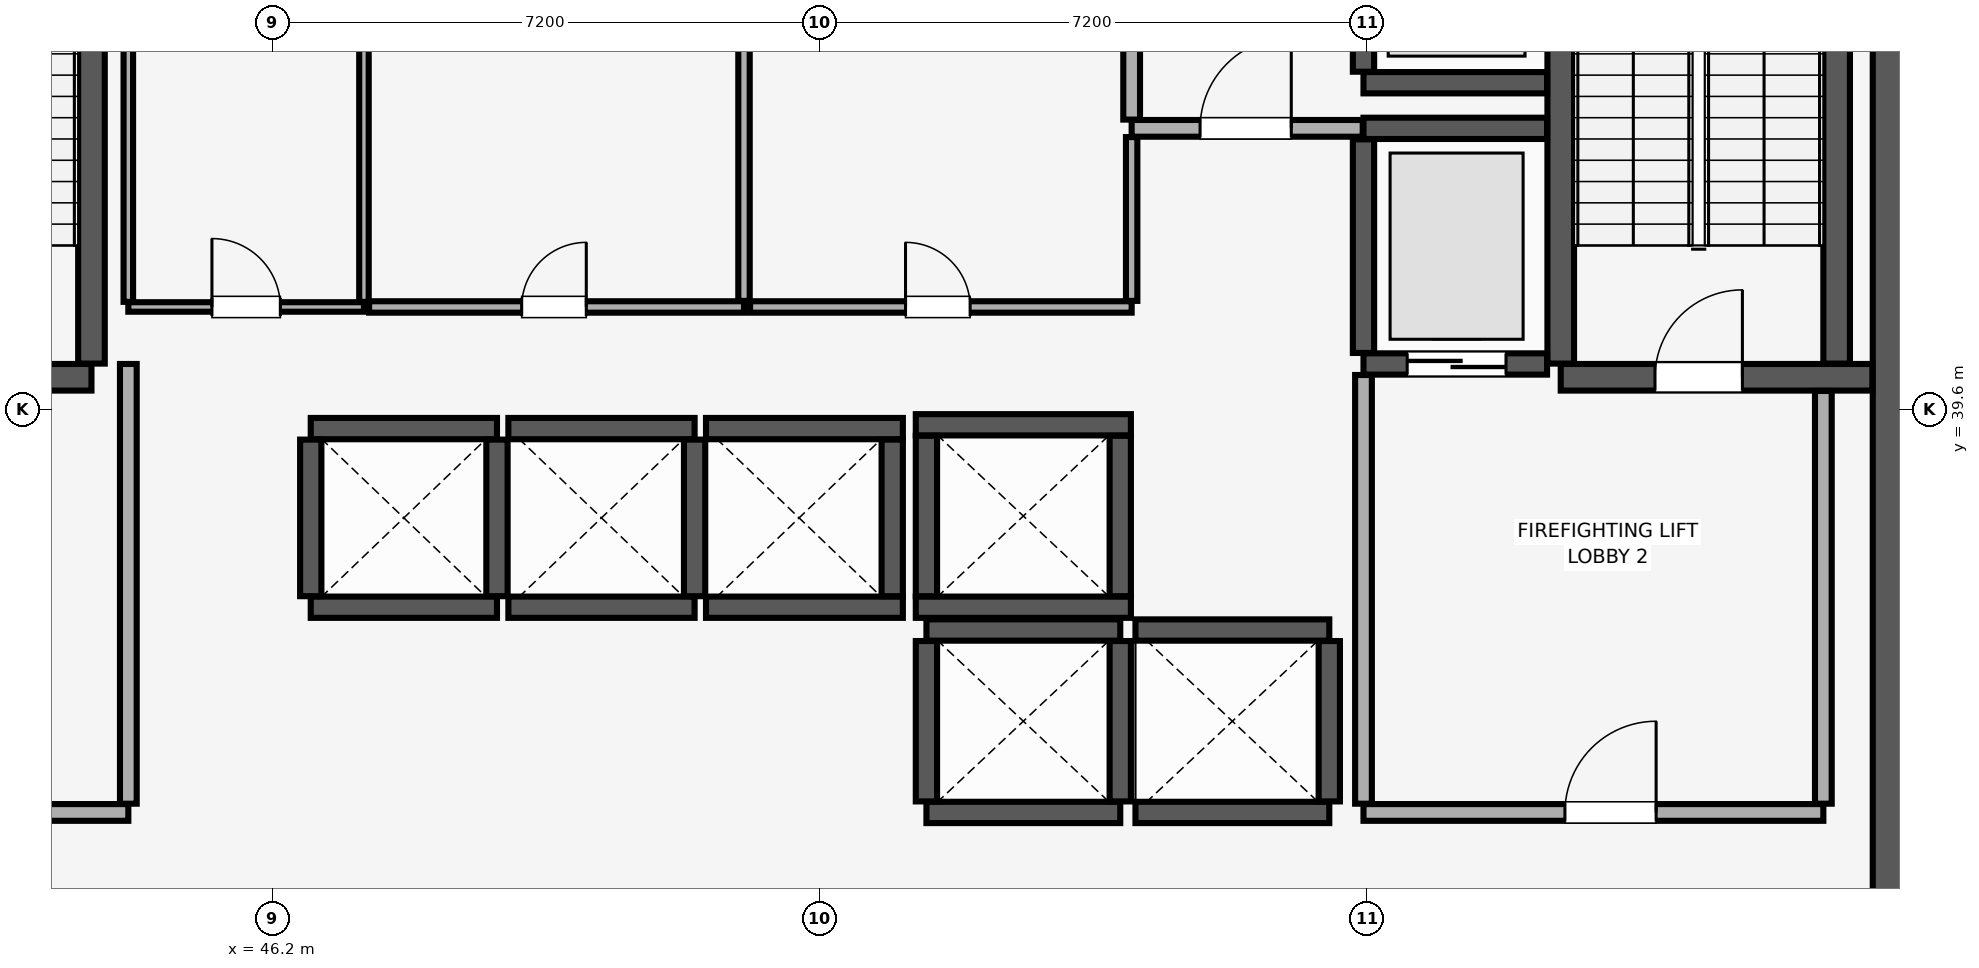
"""IFC4 building model, lengths in metres.
Left out: names, types, materials, properties, quantities, classifications, styles, units other than length and angle.
Written with IfcOpenShell. Run it as: python <this file> out.ifc"""

import sys

from ifc_helpers import new_model, si_unit, direction, frame, frame_2d, origin, place, context, subcontext, project, spatial, rectangle, extrude, element, fill, save


model = new_model("IFC4")
c1 = context("Model", 3, precision=1e-05, world=origin(), true_north=direction((0.0, 1.0)))
c2 = subcontext(c1, "Body", "Model", "MODEL_VIEW")
j1 = project(units=[si_unit("LENGTHUNIT", "METRE"), si_unit("PLANEANGLEUNIT", "RADIAN")], contexts=[c1])
p1 = place(None, origin())
s1 = spatial("IfcSite", under=j1, at=p1, CompositionType="ELEMENT")
p2 = place(p1, origin())
s2 = spatial("IfcBuilding", under=s1, at=p2, CompositionType="ELEMENT")
p3 = place(p2, frame((0.0, 0.0, 68.9)))
s3 = spatial("IfcBuildingStorey", under=s2, at=p3, CompositionType="ELEMENT", Elevation=68.9)
p4 = place(p3, frame((67.8, 29.4, 0.0), z_axis=(0.0, 0.0, 1.0), x_axis=(0.0, 1.0, 0.0)))
e1 = element("IfcWall", 1, at=p4, inside=s3, PredefinedType="SHEAR", context=c2, shape_type="SweptSolid", body=[
    extrude(rectangle(XDim=19.2, YDim=1.1, at=frame_2d((9.6, 0.0))), origin(), (0.0, 0.0, 1.0), 3.51),
])
p5 = place(p3, frame((40.185, 40.025, 0.0), z_axis=(0.0, 0.0, 1.0), x_axis=(1.0, 0.0, 0.0)))
e2 = element("IfcWall", 2, at=p5, inside=s3, PredefinedType="SHEAR", context=c2, shape_type="SweptSolid", body=[
    extrude(rectangle(XDim=3.63, YDim=0.35, at=frame_2d((1.815, 0.0))), origin(), (0.0, 0.0, 1.0), 3.51),
])
p6 = place(p5, frame((1.24, 0.0, 0.0)))
e3 = element("IfcOpeningElement", 3, at=p6, cuts=e2, PredefinedType="OPENING", context=c2, shape_type="SweptSolid", body=[
    extrude(rectangle(XDim=1.15, YDim=2.15, at=frame_2d((0.575, 1.075))), frame((0.0, 0.185, 0.0), z_axis=(0.0, -1.0, 0.0), x_axis=(1.0, 0.0, 0.0)), (0.0, 0.0, 1.0), 0.37),
])
p7 = place(p3, frame((43.815, 40.205, 0.0), z_axis=(0.0, 0.0, 1.0), x_axis=(0.0, 1.0, 0.0)))
e4 = element("IfcWall", 4, at=p7, inside=s3, PredefinedType="SHEAR", context=c2, shape_type="SweptSolid", body=[
    extrude(rectangle(XDim=8.09, YDim=0.35, at=frame_2d((4.045, 0.0))), origin(), (0.0, 0.0, 1.0), 3.51),
])
p8 = place(p3, frame((63.145, 40.025, 0.0), z_axis=(0.0, 0.0, 1.0), x_axis=(1.0, 0.0, 0.0)))
e5 = element("IfcWall", 5, at=p8, inside=s3, PredefinedType="SHEAR", context=c2, shape_type="SweptSolid", body=[
    extrude(rectangle(XDim=4.1, YDim=0.35, at=frame_2d((2.05, 0.0))), origin(), (0.0, 0.0, 1.0), 3.51),
])
p9 = place(p8, frame((1.24, 0.0, 0.0)))
e6 = element("IfcOpeningElement", 6, at=p9, cuts=e5, PredefinedType="OPENING", context=c2, shape_type="SweptSolid", body=[
    extrude(rectangle(XDim=1.15, YDim=2.15, at=frame_2d((0.575, 1.075))), frame((0.0, 0.185, 0.0), z_axis=(0.0, -1.0, 0.0), x_axis=(1.0, 0.0, 0.0)), (0.0, 0.0, 1.0), 0.37),
])
for number, where, z_axis, x_axis in (
    (7, (63.145, 40.205, 0.0), (0.0, 0.0, 1.0), (0.0, 1.0, 0.0)),
    (8, (66.775, 40.205, 0.0), (0.0, 0.0, 1.0), (0.0, 1.0, 0.0)),
):
    element("IfcWall", number, at=place(p3, frame(where, z_axis=z_axis, x_axis=x_axis)), inside=s3, PredefinedType="SHEAR", context=c2, shape_type="SweptSolid", body=[
        extrude(rectangle(XDim=8.09, YDim=0.35, at=frame_2d((4.045, 0.0))), origin(), (0.0, 0.0, 1.0), 3.51),
    ])
for number, where, z_axis, x_axis in (
    (9, (46.7, 37.0, 0.0), (0.0, 0.0, 1.0), (1.0, 0.0, 0.0)),
    (10, (46.7, 39.35, 0.0), (0.0, 0.0, 1.0), (1.0, 0.0, 0.0)),
):
    element("IfcWall", number, at=place(p3, frame(where, z_axis=z_axis, x_axis=x_axis)), inside=s3, PredefinedType="SHEAR", context=c2, shape_type="SweptSolid", body=[
        extrude(rectangle(XDim=2.45, YDim=0.28, at=frame_2d((1.225, 0.0))), origin(), (0.0, 0.0, 1.0), 3.51),
    ])
for number, where, z_axis, x_axis in (
    (11, (46.7, 37.145, 0.0), (0.0, 0.0, 1.0), (0.0, 1.0, 0.0)),
    (12, (49.15, 37.145, 0.0), (0.0, 0.0, 1.0), (0.0, 1.0, 0.0)),
):
    element("IfcWall", number, at=place(p3, frame(where, z_axis=z_axis, x_axis=x_axis)), inside=s3, PredefinedType="SHEAR", context=c2, shape_type="SweptSolid", body=[
        extrude(rectangle(XDim=2.06, YDim=0.28, at=frame_2d((1.03, 0.0))), origin(), (0.0, 0.0, 1.0), 3.51),
    ])
for number, where, z_axis, x_axis in (
    (13, (49.3, 37.0, 0.0), (0.0, 0.0, 1.0), (1.0, 0.0, 0.0)),
    (14, (49.3, 39.35, 0.0), (0.0, 0.0, 1.0), (1.0, 0.0, 0.0)),
):
    element("IfcWall", number, at=place(p3, frame(where, z_axis=z_axis, x_axis=x_axis)), inside=s3, PredefinedType="SHEAR", context=c2, shape_type="SweptSolid", body=[
        extrude(rectangle(XDim=2.45, YDim=0.28, at=frame_2d((1.225, 0.0))), origin(), (0.0, 0.0, 1.0), 3.51),
    ])
p10 = place(p3, frame((51.75, 37.145, 0.0), z_axis=(0.0, 0.0, 1.0), x_axis=(0.0, 1.0, 0.0)))
e15 = element("IfcWall", 15, at=p10, inside=s3, PredefinedType="SHEAR", context=c2, shape_type="SweptSolid", body=[
    extrude(rectangle(XDim=2.06, YDim=0.28, at=frame_2d((1.03, 0.0))), origin(), (0.0, 0.0, 1.0), 3.51),
])
for number, where, z_axis, x_axis in (
    (16, (51.9, 37.0, 0.0), (0.0, 0.0, 1.0), (1.0, 0.0, 0.0)),
    (17, (51.9, 39.35, 0.0), (0.0, 0.0, 1.0), (1.0, 0.0, 0.0)),
):
    element("IfcWall", number, at=place(p3, frame(where, z_axis=z_axis, x_axis=x_axis)), inside=s3, PredefinedType="SHEAR", context=c2, shape_type="SweptSolid", body=[
        extrude(rectangle(XDim=2.59, YDim=0.28, at=frame_2d((1.295, 0.0))), origin(), (0.0, 0.0, 1.0), 3.51),
    ])
p11 = place(p3, frame((54.35, 37.145, 0.0), z_axis=(0.0, 0.0, 1.0), x_axis=(0.0, 1.0, 0.0)))
e18 = element("IfcWall", 18, at=p11, inside=s3, PredefinedType="SHEAR", context=c2, shape_type="SweptSolid", body=[
    extrude(rectangle(XDim=2.06, YDim=0.28, at=frame_2d((1.03, 0.0))), origin(), (0.0, 0.0, 1.0), 3.51),
])
for number, where, z_axis, x_axis in (
    (19, (54.8, 34.3, 0.0), (0.0, 0.0, 1.0), (1.0, 0.0, 0.0)),
    (20, (54.8, 36.7, 0.0), (0.0, 0.0, 1.0), (1.0, 0.0, 0.0)),
):
    element("IfcWall", number, at=place(p3, frame(where, z_axis=z_axis, x_axis=x_axis)), inside=s3, PredefinedType="SHEAR", context=c2, shape_type="SweptSolid", body=[
        extrude(rectangle(XDim=2.55, YDim=0.28, at=frame_2d((1.275, 0.0))), origin(), (0.0, 0.0, 1.0), 3.51),
    ])
for number, where, z_axis, x_axis in (
    (21, (54.8, 34.445, 0.0), (0.0, 0.0, 1.0), (0.0, 1.0, 0.0)),
    (22, (57.35, 34.445, 0.0), (0.0, 0.0, 1.0), (0.0, 1.0, 0.0)),
):
    element("IfcWall", number, at=place(p3, frame(where, z_axis=z_axis, x_axis=x_axis)), inside=s3, PredefinedType="SHEAR", context=c2, shape_type="SweptSolid", body=[
        extrude(rectangle(XDim=2.11, YDim=0.28, at=frame_2d((1.055, 0.0))), origin(), (0.0, 0.0, 1.0), 3.51),
    ])
for number, where, z_axis, x_axis in (
    (23, (57.55, 34.3, 0.0), (0.0, 0.0, 1.0), (1.0, 0.0, 0.0)),
    (24, (57.55, 36.7, 0.0), (0.0, 0.0, 1.0), (1.0, 0.0, 0.0)),
):
    element("IfcWall", number, at=place(p3, frame(where, z_axis=z_axis, x_axis=x_axis)), inside=s3, PredefinedType="SHEAR", context=c2, shape_type="SweptSolid", body=[
        extrude(rectangle(XDim=2.55, YDim=0.28, at=frame_2d((1.275, 0.0))), origin(), (0.0, 0.0, 1.0), 3.51),
    ])
p12 = place(p3, frame((60.1, 34.445, 0.0), z_axis=(0.0, 0.0, 1.0), x_axis=(0.0, 1.0, 0.0)))
e25 = element("IfcWall", 25, at=p12, inside=s3, PredefinedType="SHEAR", context=c2, shape_type="SweptSolid", body=[
    extrude(rectangle(XDim=2.11, YDim=0.28, at=frame_2d((1.055, 0.0))), origin(), (0.0, 0.0, 1.0), 3.51),
])
for number, where, z_axis, x_axis in (
    (26, (54.66, 37.0, 0.0), (0.0, 0.0, 1.0), (1.0, 0.0, 0.0)),
    (27, (54.66, 39.4, 0.0), (0.0, 0.0, 1.0), (1.0, 0.0, 0.0)),
):
    element("IfcWall", number, at=place(p3, frame(where, z_axis=z_axis, x_axis=x_axis)), inside=s3, PredefinedType="SHEAR", context=c2, shape_type="SweptSolid", body=[
        extrude(rectangle(XDim=2.83, YDim=0.28, at=frame_2d((1.415, 0.0))), origin(), (0.0, 0.0, 1.0), 3.51),
    ])
for number, where, z_axis, x_axis in (
    (28, (54.8, 37.145, 0.0), (0.0, 0.0, 1.0), (0.0, 1.0, 0.0)),
    (29, (57.35, 37.145, 0.0), (0.0, 0.0, 1.0), (0.0, 1.0, 0.0)),
):
    element("IfcWall", number, at=place(p3, frame(where, z_axis=z_axis, x_axis=x_axis)), inside=s3, PredefinedType="SHEAR", context=c2, shape_type="SweptSolid", body=[
        extrude(rectangle(XDim=2.11, YDim=0.28, at=frame_2d((1.055, 0.0))), origin(), (0.0, 0.0, 1.0), 3.51),
    ])
p13 = place(p3, frame((60.55, 40.2, 0.0), z_axis=(0.0, 0.0, 1.0), x_axis=(1.0, 0.0, 0.0)))
e30 = element("IfcWall", 30, at=p13, inside=s3, PredefinedType="SHEAR", context=c2, shape_type="SweptSolid", body=[
    extrude(rectangle(XDim=2.415, YDim=0.28, at=frame_2d((1.208, 0.0))), origin(), (0.0, 0.0, 1.0), 3.51),
])
p14 = place(p13, frame((0.575, 0.0, 0.0)))
e31 = element("IfcOpeningElement", 31, at=p14, cuts=e30, PredefinedType="OPENING", context=c2, shape_type="SweptSolid", body=[
    extrude(rectangle(XDim=1.3, YDim=2.3, at=frame_2d((0.65, 1.15))), frame((0.0, 0.15, 0.0), z_axis=(0.0, -1.0, 0.0), x_axis=(1.0, 0.0, 0.0)), (0.0, 0.0, 1.0), 0.3),
])
p15 = place(p3, frame((60.55, 43.3, 0.0), z_axis=(0.0, 0.0, 1.0), x_axis=(1.0, 0.0, 0.0)))
e32 = element("IfcWall", 32, at=p15, inside=s3, PredefinedType="SHEAR", context=c2, shape_type="SweptSolid", body=[
    extrude(rectangle(XDim=2.415, YDim=0.28, at=frame_2d((1.208, 0.0))), origin(), (0.0, 0.0, 1.0), 3.51),
])
p16 = place(p3, frame((60.55, 40.345, 0.0), z_axis=(0.0, 0.0, 1.0), x_axis=(0.0, 1.0, 0.0)))
e33 = element("IfcWall", 33, at=p16, inside=s3, PredefinedType="SHEAR", context=c2, shape_type="SweptSolid", body=[
    extrude(rectangle(XDim=2.81, YDim=0.28, at=frame_2d((1.405, 0.0))), origin(), (0.0, 0.0, 1.0), 3.51),
])
p17 = place(p3, frame((60.55, 43.9, 0.0), z_axis=(0.0, 0.0, 1.0), x_axis=(1.0, 0.0, 0.0)))
e34 = element("IfcWall", 34, at=p17, inside=s3, PredefinedType="SHEAR", context=c2, shape_type="SweptSolid", body=[
    extrude(rectangle(XDim=2.415, YDim=0.28, at=frame_2d((1.208, 0.0))), origin(), (0.0, 0.0, 1.0), 3.51),
])
p18 = place(p3, frame((60.55, 44.045, 0.0), z_axis=(0.0, 0.0, 1.0), x_axis=(0.0, 1.0, 0.0)))
e35 = element("IfcWall", 35, at=p18, inside=s3, PredefinedType="SHEAR", context=c2, shape_type="SweptSolid", body=[
    extrude(rectangle(XDim=3.11, YDim=0.28, at=frame_2d((1.555, 0.0))), origin(), (0.0, 0.0, 1.0), 3.51),
])
p19 = place(p18, frame((0.905, 0.0, 0.0)))
e36 = element("IfcOpeningElement", 36, at=p19, cuts=e35, PredefinedType="OPENING", context=c2, shape_type="SweptSolid", body=[
    extrude(rectangle(XDim=1.3, YDim=2.3, at=frame_2d((0.65, 1.15))), frame((0.0, 0.15, 0.0), z_axis=(0.0, -1.0, 0.0), x_axis=(1.0, 0.0, 0.0)), (0.0, 0.0, 1.0), 0.3),
])
p20 = place(p3, frame((60.55, 34.3, 0.0), z_axis=(0.0, 0.0, 1.0), x_axis=(1.0, 0.0, 0.0)))
e37 = element("IfcWall", 37, at=p20, inside=s3, PredefinedType="PARTITIONING", context=c2, shape_type="SweptSolid", body=[
    extrude(rectangle(XDim=6.05, YDim=0.22, at=frame_2d((3.025, 0.0))), origin(), (0.0, 0.0, 1.0), 3.51),
])
p21 = place(p20, frame((2.65, 0.0, 0.0)))
e38 = element("IfcOpeningElement", 38, at=p21, cuts=e37, PredefinedType="OPENING", context=c2, shape_type="SweptSolid", body=[
    extrude(rectangle(XDim=1.2, YDim=2.15, at=frame_2d((0.6, 1.075))), frame((0.0, 0.12, 0.0), z_axis=(0.0, -1.0, 0.0), x_axis=(1.0, 0.0, 0.0)), (0.0, 0.0, 1.0), 0.24),
])
p22 = place(p3, frame((60.55, 34.415, 0.0), z_axis=(0.0, 0.0, 1.0), x_axis=(0.0, 1.0, 0.0)))
e39 = element("IfcWall", 39, at=p22, inside=s3, PredefinedType="PARTITIONING", context=c2, shape_type="SweptSolid", body=[
    extrude(rectangle(XDim=5.64, YDim=0.22, at=frame_2d((2.82, 0.0))), origin(), (0.0, 0.0, 1.0), 3.51),
])
p23 = place(p3, frame((66.6, 34.415, 0.0), z_axis=(0.0, 0.0, 1.0), x_axis=(0.0, 1.0, 0.0)))
e40 = element("IfcWall", 40, at=p23, inside=s3, PredefinedType="PARTITIONING", context=c2, shape_type="SweptSolid", body=[
    extrude(rectangle(XDim=5.43, YDim=0.22, at=frame_2d((2.715, 0.0))), origin(), (0.0, 0.0, 1.0), 3.51),
])
p24 = place(p3, frame((39.7, 34.3, 0.0), z_axis=(0.0, 0.0, 1.0), x_axis=(1.0, 0.0, 0.0)))
e41 = element("IfcWall", 41, at=p24, inside=s3, PredefinedType="PARTITIONING", context=c2, shape_type="SweptSolid", body=[
    extrude(rectangle(XDim=4.6, YDim=0.22, at=frame_2d((2.3, 0.0))), origin(), (0.0, 0.0, 1.0), 3.51),
])
p25 = place(p24, frame((1.7, 0.0, 0.0)))
e42 = element("IfcOpeningElement", 42, at=p25, cuts=e41, PredefinedType="OPENING", context=c2, shape_type="SweptSolid", body=[
    extrude(rectangle(XDim=1.2, YDim=2.15, at=frame_2d((0.6, 1.075))), frame((0.0, 0.12, 0.0), z_axis=(0.0, -1.0, 0.0), x_axis=(1.0, 0.0, 0.0)), (0.0, 0.0, 1.0), 0.24),
])
p26 = place(p3, frame((44.3, 34.415, 0.0), z_axis=(0.0, 0.0, 1.0), x_axis=(0.0, 1.0, 0.0)))
e43 = element("IfcWall", 43, at=p26, inside=s3, PredefinedType="PARTITIONING", context=c2, shape_type="SweptSolid", body=[
    extrude(rectangle(XDim=5.785, YDim=0.22, at=frame_2d((2.893, 0.0))), origin(), (0.0, 0.0, 1.0), 3.51),
])
p27 = place(p3, frame((57.5, 43.3, 0.0), z_axis=(0.0, 0.0, 1.0), x_axis=(1.0, 0.0, 0.0)))
e44 = element("IfcWall", 44, at=p27, inside=s3, PredefinedType="PARTITIONING", context=c2, shape_type="SweptSolid", body=[
    extrude(rectangle(XDim=3.04, YDim=0.22, at=frame_2d((1.52, 0.0))), origin(), (0.0, 0.0, 1.0), 3.51),
])
p28 = place(p27, frame((0.9, 0.0, 0.0)))
e45 = element("IfcOpeningElement", 45, at=p28, cuts=e44, PredefinedType="OPENING", context=c2, shape_type="SweptSolid", body=[
    extrude(rectangle(XDim=1.2, YDim=2.15, at=frame_2d((0.6, 1.075))), frame((0.0, 0.12, 0.0), z_axis=(0.0, -1.0, 0.0), x_axis=(1.0, 0.0, 0.0)), (0.0, 0.0, 1.0), 0.24),
])
p29 = place(p3, frame((57.5, 43.415, 0.0), z_axis=(0.0, 0.0, 1.0), x_axis=(0.0, 1.0, 0.0)))
e46 = element("IfcWall", 46, at=p29, inside=s3, PredefinedType="PARTITIONING", context=c2, shape_type="SweptSolid", body=[
    extrude(rectangle(XDim=5.435, YDim=0.22, at=frame_2d((2.718, 0.0))), origin(), (0.0, 0.0, 1.0), 3.51),
])
p30 = place(p3, frame((44.3, 40.95, 0.0), z_axis=(0.0, 0.0, 1.0), x_axis=(1.0, 0.0, 0.0)))
e47 = element("IfcWall", 47, at=p30, inside=s3, PredefinedType="PARTITIONING", context=c2, shape_type="SweptSolid", body=[
    extrude(rectangle(XDim=3.1, YDim=0.125, at=frame_2d((1.55, 0.0))), origin(), (0.0, 0.0, 1.0), 3.51),
])
p31 = place(p30, frame((1.1, 0.0, 0.0)))
e48 = element("IfcOpeningElement", 48, at=p31, cuts=e47, PredefinedType="OPENING", context=c2, shape_type="SweptSolid", body=[
    extrude(rectangle(XDim=0.9, YDim=2.1, at=frame_2d((0.45, 1.05))), frame((0.0, 0.073, 0.0), z_axis=(0.0, -1.0, 0.0), x_axis=(1.0, 0.0, 0.0)), (0.0, 0.0, 1.0), 0.145),
])
for number, where, z_axis, x_axis in (
    (49, (44.3, 41.018, 0.0), (0.0, 0.0, 1.0), (0.0, 1.0, 0.0)),
    (50, (47.4, 41.018, 0.0), (0.0, 0.0, 1.0), (0.0, 1.0, 0.0)),
):
    element("IfcWall", number, at=place(p3, frame(where, z_axis=z_axis, x_axis=x_axis)), inside=s3, PredefinedType="PARTITIONING", context=c2, shape_type="SweptSolid", body=[
        extrude(rectangle(XDim=7.833, YDim=0.125, at=frame_2d((3.916, 0.0))), origin(), (0.0, 0.0, 1.0), 3.51),
    ])
p32 = place(p3, frame((47.468, 40.95, 0.0), z_axis=(0.0, 0.0, 1.0), x_axis=(1.0, 0.0, 0.0)))
e51 = element("IfcWall", 51, at=p32, inside=s3, PredefinedType="PARTITIONING", context=c2, shape_type="SweptSolid", body=[
    extrude(rectangle(XDim=4.932, YDim=0.15, at=frame_2d((2.466, 0.0))), origin(), (0.0, 0.0, 1.0), 3.51),
])
p33 = place(p32, frame((2.008, 0.0, 0.0)))
e52 = element("IfcOpeningElement", 52, at=p33, cuts=e51, PredefinedType="OPENING", context=c2, shape_type="SweptSolid", body=[
    extrude(rectangle(XDim=0.85, YDim=2.1, at=frame_2d((0.425, 1.05))), frame((0.0, 0.085, 0.0), z_axis=(0.0, -1.0, 0.0), x_axis=(1.0, 0.0, 0.0)), (0.0, 0.0, 1.0), 0.17),
])
p34 = place(p3, frame((52.4, 41.03, 0.0), z_axis=(0.0, 0.0, 1.0), x_axis=(0.0, 1.0, 0.0)))
e53 = element("IfcWall", 53, at=p34, inside=s3, PredefinedType="PARTITIONING", context=c2, shape_type="SweptSolid", body=[
    extrude(rectangle(XDim=7.82, YDim=0.15, at=frame_2d((3.91, 0.0))), origin(), (0.0, 0.0, 1.0), 3.51),
])
p35 = place(p3, frame((52.48, 40.95, 0.0), z_axis=(0.0, 0.0, 1.0), x_axis=(1.0, 0.0, 0.0)))
e54 = element("IfcWall", 54, at=p35, inside=s3, PredefinedType="PARTITIONING", context=c2, shape_type="SweptSolid", body=[
    extrude(rectangle(XDim=5.02, YDim=0.15, at=frame_2d((2.51, 0.0))), origin(), (0.0, 0.0, 1.0), 3.51),
])
p36 = place(p35, frame((2.045, 0.0, 0.0)))
e55 = element("IfcOpeningElement", 55, at=p36, cuts=e54, PredefinedType="OPENING", context=c2, shape_type="SweptSolid", body=[
    extrude(rectangle(XDim=0.85, YDim=2.1, at=frame_2d((0.425, 1.05))), frame((0.0, 0.085, 0.0), z_axis=(0.0, -1.0, 0.0), x_axis=(1.0, 0.0, 0.0)), (0.0, 0.0, 1.0), 0.17),
])
p37 = place(p3, frame((57.5, 41.03, 0.0), z_axis=(0.0, 0.0, 1.0), x_axis=(0.0, 1.0, 0.0)))
e56 = element("IfcWall", 56, at=p37, inside=s3, PredefinedType="PARTITIONING", context=c2, shape_type="SweptSolid", body=[
    extrude(rectangle(XDim=2.155, YDim=0.15, at=frame_2d((1.078, 0.0))), origin(), (0.0, 0.0, 1.0), 3.51),
])
p38 = place(p9, origin())
e57 = element("IfcDoor", 57, at=p38, inside=s3, OperationType="SINGLE_SWING_RIGHT", PredefinedType="DOOR", context=c2, shape_type="SweptSolid", body=[
    extrude(rectangle(XDim=1.15, YDim=2.15, at=frame_2d((0.575, 1.075))), frame((0.0, 0.025, 0.0), z_axis=(0.0, -1.0, 0.0), x_axis=(1.0, 0.0, 0.0)), (0.0, 0.0, 1.0), 0.05),
])
fill(e6, e57)
p39 = place(p14, origin())
e58 = element("IfcDoor", 58, at=p39, inside=s3, OperationType="DOUBLE_DOOR_SLIDING", PredefinedType="DOOR", context=c2, shape_type="SweptSolid", body=[
    extrude(rectangle(XDim=1.3, YDim=2.3, at=frame_2d((0.65, 1.15))), frame((0.0, 0.025, 0.0), z_axis=(0.0, -1.0, 0.0), x_axis=(1.0, 0.0, 0.0)), (0.0, 0.0, 1.0), 0.05),
])
fill(e31, e58)
p40 = place(p21, origin())
e59 = element("IfcDoor", 59, at=p40, inside=s3, OperationType="SINGLE_SWING_RIGHT", PredefinedType="DOOR", context=c2, shape_type="SweptSolid", body=[
    extrude(rectangle(XDim=1.2, YDim=2.15, at=frame_2d((0.6, 1.075))), frame((0.0, 0.025, 0.0), z_axis=(0.0, -1.0, 0.0), x_axis=(1.0, 0.0, 0.0)), (0.0, 0.0, 1.0), 0.05),
])
fill(e38, e59)
p41 = place(p28, origin())
e60 = element("IfcDoor", 60, at=p41, inside=s3, OperationType="SINGLE_SWING_RIGHT", PredefinedType="DOOR", context=c2, shape_type="SweptSolid", body=[
    extrude(rectangle(XDim=1.2, YDim=2.15, at=frame_2d((0.6, 1.075))), frame((0.0, 0.025, 0.0), z_axis=(0.0, -1.0, 0.0), x_axis=(1.0, 0.0, 0.0)), (0.0, 0.0, 1.0), 0.05),
])
fill(e45, e60)
p42 = place(p31, origin())
e61 = element("IfcDoor", 61, at=p42, inside=s3, OperationType="SINGLE_SWING_LEFT", PredefinedType="DOOR", context=c2, shape_type="SweptSolid", body=[
    extrude(rectangle(XDim=0.9, YDim=2.1, at=frame_2d((0.45, 1.05))), frame((0.0, 0.025, 0.0), z_axis=(0.0, -1.0, 0.0), x_axis=(1.0, 0.0, 0.0)), (0.0, 0.0, 1.0), 0.05),
])
fill(e48, e61)
p43 = place(p33, origin())
e62 = element("IfcDoor", 62, at=p43, inside=s3, OperationType="SINGLE_SWING_RIGHT", PredefinedType="DOOR", context=c2, shape_type="SweptSolid", body=[
    extrude(rectangle(XDim=0.85, YDim=2.1, at=frame_2d((0.425, 1.05))), frame((0.0, 0.025, 0.0), z_axis=(0.0, -1.0, 0.0), x_axis=(1.0, 0.0, 0.0)), (0.0, 0.0, 1.0), 0.05),
])
fill(e52, e62)
p44 = place(p36, origin())
e63 = element("IfcDoor", 63, at=p44, inside=s3, OperationType="SINGLE_SWING_LEFT", PredefinedType="DOOR", context=c2, shape_type="SweptSolid", body=[
    extrude(rectangle(XDim=0.85, YDim=2.1, at=frame_2d((0.425, 1.05))), frame((0.0, 0.025, 0.0), z_axis=(0.0, -1.0, 0.0), x_axis=(1.0, 0.0, 0.0)), (0.0, 0.0, 1.0), 0.05),
])
fill(e55, e63)
save(model, sys.argv[1])
